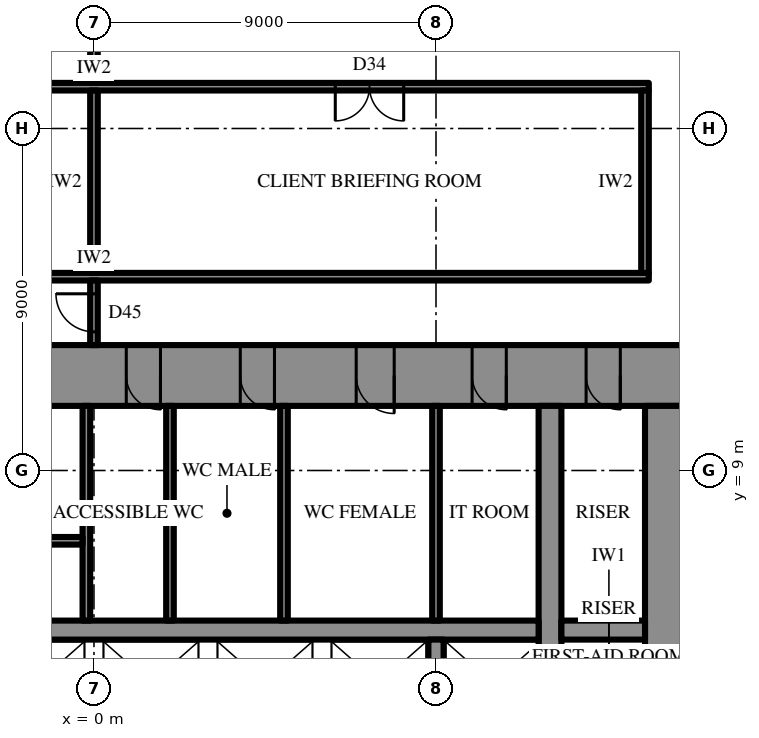
"""IFC4 building model, lengths in metres.
Left out: names, types, materials, properties, quantities, classifications, styles, units other than length and angle.
Written with IfcOpenShell. Run it as: python <this file> out.ifc"""

import sys

from ifc_helpers import new_model, si_unit, direction, frame, frame_2d, origin, place, context, subcontext, project, spatial, rectangle, extrude, element, fill, save


model = new_model("IFC4")
c1 = context("Model", 3, precision=1e-05, world=origin(), true_north=direction((0.0, 1.0)))
c2 = subcontext(c1, "Body", "Model", "MODEL_VIEW")
j1 = project(units=[si_unit("LENGTHUNIT", "METRE"), si_unit("PLANEANGLEUNIT", "RADIAN")], contexts=[c1])
p1 = place(None, origin())
s1 = spatial("IfcSite", under=j1, at=p1, CompositionType="ELEMENT")
p2 = place(p1, origin())
s2 = spatial("IfcBuilding", under=s1, at=p2, CompositionType="ELEMENT")
p3 = place(p2, frame((0.0, 0.0, 215.5)))
s3 = spatial("IfcBuildingStorey", under=s2, at=p3, CompositionType="ELEMENT", Elevation=215.5)
p4 = place(p3, frame((-15.5, 11.5, 0.0), z_axis=(0.0, 0.0, 1.0), x_axis=(1.0, 0.0, 0.0)))
e1 = element("IfcWall", 1, at=p4, inside=s3, PredefinedType="SHEAR", context=c2, shape_type="SweptSolid", body=[
    extrude(rectangle(XDim=31.0, YDim=1.6, at=frame_2d((15.5, 0.0))), origin(), (0.0, 0.0, 1.0), 4.2),
])
p5 = place(p4, frame((16.35, 0.0, 0.0)))
e2 = element("IfcOpeningElement", 2, at=p5, cuts=e1, PredefinedType="OPENING", context=c2, shape_type="SweptSolid", body=[
    extrude(rectangle(XDim=0.9, YDim=2.2, at=frame_2d((0.45, 1.1))), frame((0.0, 0.81, 0.0), z_axis=(0.0, -1.0, 0.0), x_axis=(1.0, 0.0, 0.0)), (0.0, 0.0, 1.0), 1.62),
])
p6 = place(p4, frame((19.35, 0.0, 0.0)))
e3 = element("IfcOpeningElement", 3, at=p6, cuts=e1, PredefinedType="OPENING", context=c2, shape_type="SweptSolid", body=[
    extrude(rectangle(XDim=0.9, YDim=2.2, at=frame_2d((0.45, 1.1))), frame((0.0, 0.81, 0.0), z_axis=(0.0, -1.0, 0.0), x_axis=(1.0, 0.0, 0.0)), (0.0, 0.0, 1.0), 1.62),
])
p7 = place(p4, frame((22.4, 0.0, 0.0)))
e4 = element("IfcOpeningElement", 4, at=p7, cuts=e1, PredefinedType="OPENING", context=c2, shape_type="SweptSolid", body=[
    extrude(rectangle(XDim=1.0, YDim=2.2, at=frame_2d((0.5, 1.1))), frame((0.0, 0.81, 0.0), z_axis=(0.0, -1.0, 0.0), x_axis=(1.0, 0.0, 0.0)), (0.0, 0.0, 1.0), 1.62),
])
p8 = place(p4, frame((1.65, 0.0, 0.0)))
e5 = element("IfcOpeningElement", 5, at=p8, cuts=e1, PredefinedType="OPENING", context=c2, shape_type="SweptSolid", body=[
    extrude(rectangle(XDim=0.9, YDim=2.2, at=frame_2d((0.45, 1.1))), frame((0.0, 0.81, 0.0), z_axis=(0.0, -1.0, 0.0), x_axis=(1.0, 0.0, 0.0)), (0.0, 0.0, 1.0), 1.62),
])
p9 = place(p4, frame((4.65, 0.0, 0.0)))
e6 = element("IfcOpeningElement", 6, at=p9, cuts=e1, PredefinedType="OPENING", context=c2, shape_type="SweptSolid", body=[
    extrude(rectangle(XDim=0.9, YDim=2.2, at=frame_2d((0.45, 1.1))), frame((0.0, 0.81, 0.0), z_axis=(0.0, -1.0, 0.0), x_axis=(1.0, 0.0, 0.0)), (0.0, 0.0, 1.0), 1.62),
])
p10 = place(p4, frame((25.45, 0.0, 0.0)))
e7 = element("IfcOpeningElement", 7, at=p10, cuts=e1, PredefinedType="OPENING", context=c2, shape_type="SweptSolid", body=[
    extrude(rectangle(XDim=0.9, YDim=2.2, at=frame_2d((0.45, 1.1))), frame((0.0, 0.81, 0.0), z_axis=(0.0, -1.0, 0.0), x_axis=(1.0, 0.0, 0.0)), (0.0, 0.0, 1.0), 1.62),
])
p11 = place(p4, frame((28.45, 0.0, 0.0)))
e8 = element("IfcOpeningElement", 8, at=p11, cuts=e1, PredefinedType="OPENING", context=c2, shape_type="SweptSolid", body=[
    extrude(rectangle(XDim=0.9, YDim=2.2, at=frame_2d((0.45, 1.1))), frame((0.0, 0.81, 0.0), z_axis=(0.0, -1.0, 0.0), x_axis=(1.0, 0.0, 0.0)), (0.0, 0.0, 1.0), 1.62),
])
p12 = place(p3, frame((15.0, -10.7, 0.0), z_axis=(0.0, 0.0, 1.0), x_axis=(0.0, 1.0, 0.0)))
e9 = element("IfcWall", 9, at=p12, inside=s3, PredefinedType="SHEAR", context=c2, shape_type="SweptSolid", body=[
    extrude(rectangle(XDim=21.4, YDim=1.0, at=frame_2d((10.7, 0.0))), origin(), (0.0, 0.0, 1.0), 4.2),
])
p13 = place(p12, frame((9.8, 0.0, 0.0)))
e10 = element("IfcOpeningElement", 10, at=p13, cuts=e9, PredefinedType="OPENING", context=c2, shape_type="SweptSolid", body=[
    extrude(rectangle(XDim=1.8, YDim=2.4, at=frame_2d((0.9, 1.2))), frame((0.0, 0.51, 0.0), z_axis=(0.0, -1.0, 0.0), x_axis=(1.0, 0.0, 0.0)), (0.0, 0.0, 1.0), 1.02),
])
p14 = place(p3, frame((12.0, -10.7, 0.0), z_axis=(0.0, 0.0, 1.0), x_axis=(0.0, 1.0, 0.0)))
e11 = element("IfcWall", 11, at=p14, inside=s3, PredefinedType="SHEAR", context=c2, shape_type="SweptSolid", body=[
    extrude(rectangle(XDim=21.4, YDim=0.6, at=frame_2d((10.7, 0.0))), origin(), (0.0, 0.0, 1.0), 4.2),
])
p15 = place(p14, frame((9.8, 0.0, 0.0)))
e12 = element("IfcOpeningElement", 12, at=p15, cuts=e11, PredefinedType="OPENING", context=c2, shape_type="SweptSolid", body=[
    extrude(rectangle(XDim=1.8, YDim=2.4, at=frame_2d((0.9, 1.2))), frame((0.0, 0.31, 0.0), z_axis=(0.0, -1.0, 0.0), x_axis=(1.0, 0.0, 0.0)), (0.0, 0.0, 1.0), 0.62),
])
p16 = place(p3, frame((-11.7, 4.8, 0.0), z_axis=(0.0, 0.0, 1.0), x_axis=(1.0, 0.0, 0.0)))
e13 = element("IfcWall", 13, at=p16, inside=s3, PredefinedType="SHEAR", context=c2, shape_type="SweptSolid", body=[
    extrude(rectangle(XDim=23.4, YDim=0.5, at=frame_2d((11.7, 0.0))), origin(), (0.0, 0.0, 1.0), 4.2),
])
p17 = place(p16, frame((6.6, 0.0, 0.0)))
e14 = element("IfcOpeningElement", 14, at=p17, cuts=e13, PredefinedType="OPENING", context=c2, shape_type="SweptSolid", body=[
    extrude(rectangle(XDim=1.2, YDim=2.2, at=frame_2d((0.6, 1.1))), frame((0.0, 0.26, 0.0), z_axis=(0.0, -1.0, 0.0), x_axis=(1.0, 0.0, 0.0)), (0.0, 0.0, 1.0), 0.52),
])
p18 = place(p16, frame((3.6, 0.0, 0.0)))
e15 = element("IfcOpeningElement", 15, at=p18, cuts=e13, PredefinedType="OPENING", context=c2, shape_type="SweptSolid", body=[
    extrude(rectangle(XDim=1.2, YDim=2.2, at=frame_2d((0.6, 1.1))), frame((0.0, 0.26, 0.0), z_axis=(0.0, -1.0, 0.0), x_axis=(1.0, 0.0, 0.0)), (0.0, 0.0, 1.0), 0.52),
])
p19 = place(p3, frame((12.3, 4.8, 0.0), z_axis=(0.0, 0.0, 1.0), x_axis=(1.0, 0.0, 0.0)))
e16 = element("IfcWall", 16, at=p19, inside=s3, PredefinedType="SHEAR", context=c2, shape_type="SweptSolid", body=[
    extrude(rectangle(XDim=2.2, YDim=0.5, at=frame_2d((1.1, 0.0))), origin(), (0.0, 0.0, 1.0), 4.2),
])
p20 = place(p3, frame((9.0, 2.25, 0.0), z_axis=(0.0, 0.0, 1.0), x_axis=(0.0, 1.0, 0.0)))
e17 = element("IfcWall", 17, at=p20, inside=s3, PredefinedType="SHEAR", context=c2, shape_type="SweptSolid", body=[
    extrude(rectangle(XDim=2.3, YDim=0.4, at=frame_2d((1.15, 0.0))), origin(), (0.0, 0.0, 1.0), 4.2),
])
p21 = place(p3, frame((-0.2, 5.05, 0.0), z_axis=(0.0, 0.0, 1.0), x_axis=(0.0, 1.0, 0.0)))
e18 = element("IfcWall", 18, at=p21, inside=s3, PredefinedType="SHEAR", context=c2, shape_type="SweptSolid", body=[
    extrude(rectangle(XDim=5.65, YDim=0.2, at=frame_2d((2.825, 0.0))), origin(), (0.0, 0.0, 1.0), 4.2),
])
p22 = place(p3, frame((-8.9, 7.15, 0.0), z_axis=(0.0, 0.0, 1.0), x_axis=(1.0, 0.0, 0.0)))
e19 = element("IfcWall", 19, at=p22, inside=s3, PredefinedType="SHEAR", context=c2, shape_type="SweptSolid", body=[
    extrude(rectangle(XDim=8.6, YDim=0.2, at=frame_2d((4.3, 0.0))), origin(), (0.0, 0.0, 1.0), 4.2),
])
p23 = place(p22, frame((0.3, 0.0, 0.0)))
e20 = element("IfcOpeningElement", 20, at=p23, cuts=e19, PredefinedType="OPENING", context=c2, shape_type="SweptSolid", body=[
    extrude(rectangle(XDim=1.0, YDim=2.2, at=frame_2d((0.5, 1.1))), frame((0.0, 0.11, 0.0), z_axis=(0.0, -1.0, 0.0), x_axis=(1.0, 0.0, 0.0)), (0.0, 0.0, 1.0), 0.22),
])
for number, where, z_axis, x_axis in (
    (21, (9.0, 5.05, 0.0), (0.0, 0.0, 1.0), (0.0, 1.0, 0.0)),
    (22, (2.0, 5.05, 0.0), (0.0, 0.0, 1.0), (0.0, 1.0, 0.0)),
    (23, (5.0, 5.05, 0.0), (0.0, 0.0, 1.0), (0.0, 1.0, 0.0)),
):
    element("IfcWall", number, at=place(p3, frame(where, z_axis=z_axis, x_axis=x_axis)), inside=s3, PredefinedType="PARTITIONING", context=c2, shape_type="SweptSolid", body=[
        extrude(rectangle(XDim=5.65, YDim=0.2, at=frame_2d((2.825, 0.0))), origin(), (0.0, 0.0, 1.0), 4.0),
    ])
p24 = place(p3, frame((-14.6, 14.1, 0.0), z_axis=(0.0, 0.0, 1.0), x_axis=(1.0, 0.0, 0.0)))
e24 = element("IfcWall", 24, at=p24, inside=s3, PredefinedType="PARTITIONING", context=c2, shape_type="SweptSolid", body=[
    extrude(rectangle(XDim=29.2, YDim=0.2, at=frame_2d((14.6, 0.0))), origin(), (0.0, 0.0, 1.0), 4.0),
])
p25 = place(p3, frame((-14.6, 19.1, 0.0), z_axis=(0.0, 0.0, 1.0), x_axis=(1.0, 0.0, 0.0)))
e25 = element("IfcWall", 25, at=p25, inside=s3, PredefinedType="PARTITIONING", context=c2, shape_type="SweptSolid", body=[
    extrude(rectangle(XDim=29.2, YDim=0.2, at=frame_2d((14.6, 0.0))), origin(), (0.0, 0.0, 1.0), 4.0),
])
p26 = place(p25, frame((6.45, 0.0, 0.0)))
e26 = element("IfcOpeningElement", 26, at=p26, cuts=e25, PredefinedType="OPENING", context=c2, shape_type="SweptSolid", body=[
    extrude(rectangle(XDim=1.8, YDim=2.4, at=frame_2d((0.9, 1.2))), frame((0.0, 0.11, 0.0), z_axis=(0.0, -1.0, 0.0), x_axis=(1.0, 0.0, 0.0)), (0.0, 0.0, 1.0), 0.22),
])
p27 = place(p25, frame((20.95, 0.0, 0.0)))
e27 = element("IfcOpeningElement", 27, at=p27, cuts=e25, PredefinedType="OPENING", context=c2, shape_type="SweptSolid", body=[
    extrude(rectangle(XDim=1.8, YDim=2.4, at=frame_2d((0.9, 1.2))), frame((0.0, 0.11, 0.0), z_axis=(0.0, -1.0, 0.0), x_axis=(1.0, 0.0, 0.0)), (0.0, 0.0, 1.0), 0.22),
])
p28 = place(p3, frame((0.0, 14.2, 0.0), z_axis=(0.0, 0.0, 1.0), x_axis=(0.0, 1.0, 0.0)))
e28 = element("IfcWall", 28, at=p28, inside=s3, PredefinedType="PARTITIONING", context=c2, shape_type="SweptSolid", body=[
    extrude(rectangle(XDim=4.8, YDim=0.2, at=frame_2d((2.4, 0.0))), origin(), (0.0, 0.0, 1.0), 2.992),
])
p29 = place(p3, frame((14.5, 14.2, 0.0), z_axis=(0.0, 0.0, 1.0), x_axis=(0.0, 1.0, 0.0)))
e29 = element("IfcWall", 29, at=p29, inside=s3, PredefinedType="PARTITIONING", context=c2, shape_type="SweptSolid", body=[
    extrude(rectangle(XDim=4.8, YDim=0.2, at=frame_2d((2.4, 0.0))), origin(), (0.0, 0.0, 1.0), 4.0),
])
p30 = place(p3, frame((0.0, 12.3, 0.0), z_axis=(0.0, 0.0, 1.0), x_axis=(0.0, 1.0, 0.0)))
e30 = element("IfcWall", 30, at=p30, inside=s3, PredefinedType="PARTITIONING", context=c2, shape_type="SweptSolid", body=[
    extrude(rectangle(XDim=1.7, YDim=0.2, at=frame_2d((0.85, 0.0))), origin(), (0.0, 0.0, 1.0), 2.992),
])
p31 = place(p30, frame((0.35, 0.0, 0.0)))
e31 = element("IfcOpeningElement", 31, at=p31, cuts=e30, PredefinedType="OPENING", context=c2, shape_type="SweptSolid", body=[
    extrude(rectangle(XDim=1.0, YDim=2.2, at=frame_2d((0.5, 1.1))), frame((0.0, 0.11, 0.0), z_axis=(0.0, -1.0, 0.0), x_axis=(1.0, 0.0, 0.0)), (0.0, 0.0, 1.0), 0.22),
])
p32 = place(p3, frame((0.0, 19.2, 0.0), z_axis=(0.0, 0.0, 1.0), x_axis=(0.0, 1.0, 0.0)))
e32 = element("IfcWall", 32, at=p32, inside=s3, PredefinedType="PARTITIONING", context=c2, shape_type="SweptSolid", body=[
    extrude(rectangle(XDim=8.05, YDim=0.2, at=frame_2d((4.025, 0.0))), origin(), (0.0, 0.0, 1.0), 2.992),
])
p33 = place(p5, frame((0.9, 0.0, 0.0), z_axis=(0.0, 0.0, 1.0), x_axis=(-1.0, 0.0, 0.0)))
e33 = element("IfcDoor", 33, at=p33, inside=s3, OperationType="SINGLE_SWING_RIGHT", PredefinedType="DOOR", context=c2, shape_type="SweptSolid", body=[
    extrude(rectangle(XDim=0.9, YDim=2.2, at=frame_2d((0.45, 1.1))), frame((0.0, 0.025, 0.0), z_axis=(0.0, -1.0, 0.0), x_axis=(1.0, 0.0, 0.0)), (0.0, 0.0, 1.0), 0.05),
])
fill(e2, e33)
p34 = place(p6, frame((0.9, 0.0, 0.0), z_axis=(0.0, 0.0, 1.0), x_axis=(-1.0, 0.0, 0.0)))
e34 = element("IfcDoor", 34, at=p34, inside=s3, OperationType="SINGLE_SWING_RIGHT", PredefinedType="DOOR", context=c2, shape_type="SweptSolid", body=[
    extrude(rectangle(XDim=0.9, YDim=2.2, at=frame_2d((0.45, 1.1))), frame((0.0, 0.025, 0.0), z_axis=(0.0, -1.0, 0.0), x_axis=(1.0, 0.0, 0.0)), (0.0, 0.0, 1.0), 0.05),
])
fill(e3, e34)
p35 = place(p7, frame((1.0, 0.0, 0.0), z_axis=(0.0, 0.0, 1.0), x_axis=(-1.0, 0.0, 0.0)))
e35 = element("IfcDoor", 35, at=p35, inside=s3, OperationType="SINGLE_SWING_RIGHT", PredefinedType="DOOR", context=c2, shape_type="SweptSolid", body=[
    extrude(rectangle(XDim=1.0, YDim=2.2, at=frame_2d((0.5, 1.1))), frame((0.0, 0.025, 0.0), z_axis=(0.0, -1.0, 0.0), x_axis=(1.0, 0.0, 0.0)), (0.0, 0.0, 1.0), 0.05),
])
fill(e4, e35)
p36 = place(p10, frame((0.9, 0.0, 0.0), z_axis=(0.0, 0.0, 1.0), x_axis=(-1.0, 0.0, 0.0)))
e36 = element("IfcDoor", 36, at=p36, inside=s3, OperationType="SINGLE_SWING_RIGHT", PredefinedType="DOOR", context=c2, shape_type="SweptSolid", body=[
    extrude(rectangle(XDim=0.9, YDim=2.2, at=frame_2d((0.45, 1.1))), frame((0.0, 0.025, 0.0), z_axis=(0.0, -1.0, 0.0), x_axis=(1.0, 0.0, 0.0)), (0.0, 0.0, 1.0), 0.05),
])
fill(e7, e36)
p37 = place(p11, frame((0.9, 0.0, 0.0), z_axis=(0.0, 0.0, 1.0), x_axis=(-1.0, 0.0, 0.0)))
e37 = element("IfcDoor", 37, at=p37, inside=s3, OperationType="SINGLE_SWING_RIGHT", PredefinedType="DOOR", context=c2, shape_type="SweptSolid", body=[
    extrude(rectangle(XDim=0.9, YDim=2.2, at=frame_2d((0.45, 1.1))), frame((0.0, 0.025, 0.0), z_axis=(0.0, -1.0, 0.0), x_axis=(1.0, 0.0, 0.0)), (0.0, 0.0, 1.0), 0.05),
])
fill(e8, e37)
p38 = place(p27, frame((1.8, 0.0, 0.0), z_axis=(0.0, 0.0, 1.0), x_axis=(-1.0, 0.0, 0.0)))
e38 = element("IfcDoor", 38, at=p38, inside=s3, OperationType="DOUBLE_DOOR_SINGLE_SWING", PredefinedType="DOOR", context=c2, shape_type="SweptSolid", body=[
    extrude(rectangle(XDim=1.8, YDim=2.4, at=frame_2d((0.9, 1.2))), frame((0.0, 0.025, 0.0), z_axis=(0.0, -1.0, 0.0), x_axis=(1.0, 0.0, 0.0)), (0.0, 0.0, 1.0), 0.05),
])
fill(e27, e38)
p39 = place(p31, origin())
e39 = element("IfcDoor", 39, at=p39, inside=s3, OperationType="SINGLE_SWING_LEFT", PredefinedType="DOOR", context=c2, shape_type="SweptSolid", body=[
    extrude(rectangle(XDim=1.0, YDim=2.2, at=frame_2d((0.5, 1.1))), frame((0.0, 0.025, 0.0), z_axis=(0.0, -1.0, 0.0), x_axis=(1.0, 0.0, 0.0)), (0.0, 0.0, 1.0), 0.05),
])
fill(e31, e39)
save(model, sys.argv[1])
